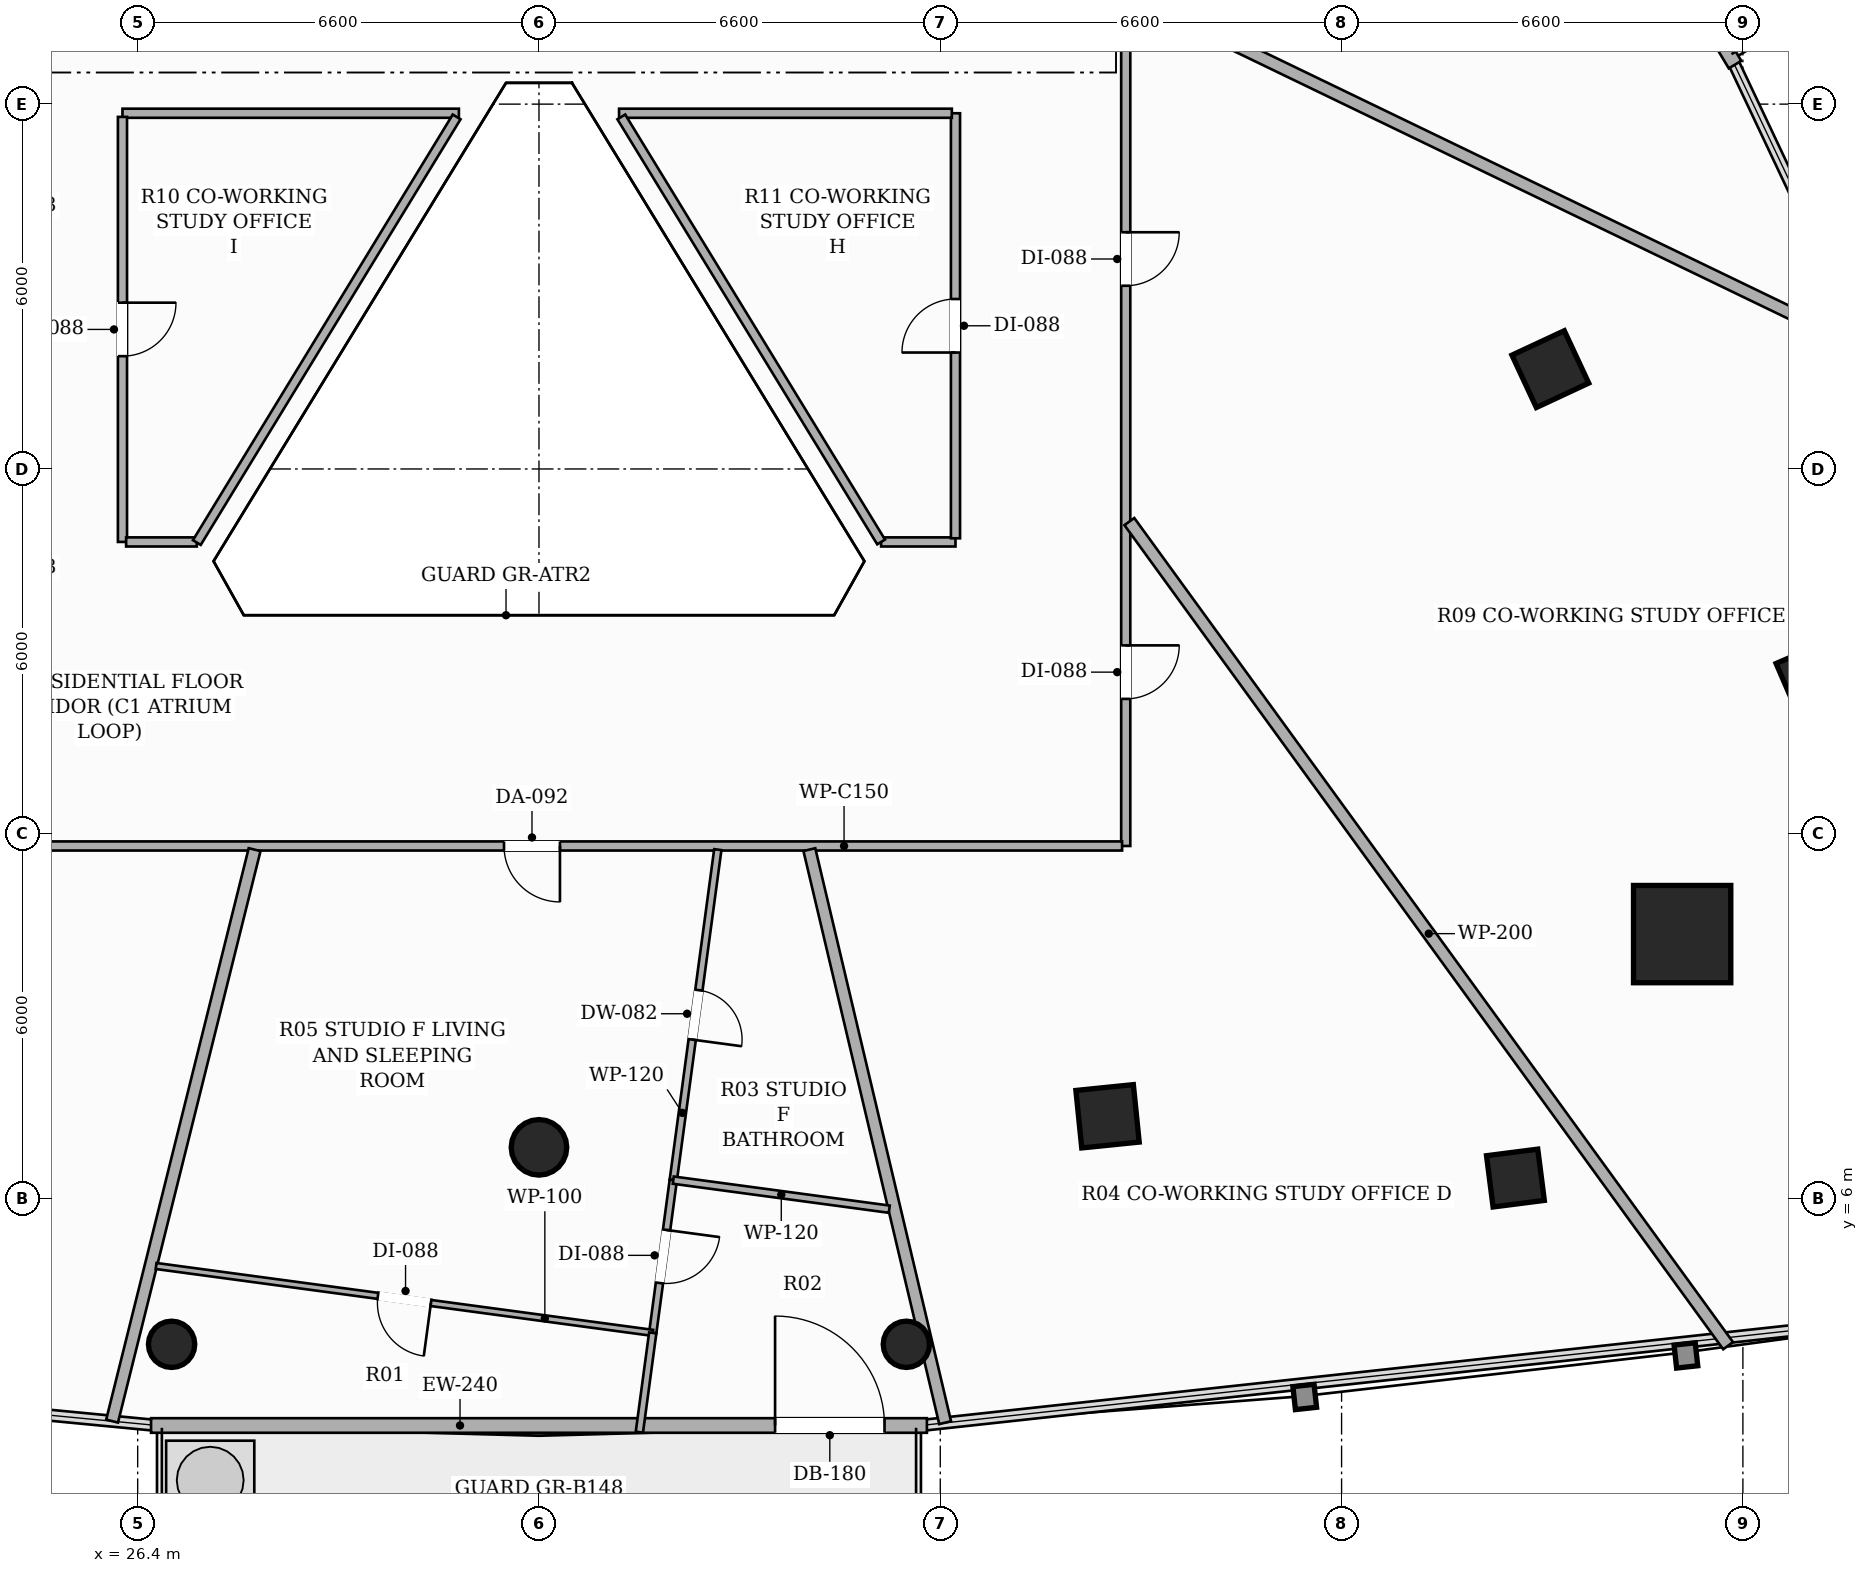
"""IFC4 building model, lengths in metres.
Left out: names, types, materials, properties, quantities, classifications, styles, units other than length and angle.
Written with IfcOpenShell. Run it as: python <this file> out.ifc"""

import sys

from ifc_helpers import new_model, si_unit, direction, frame, frame_2d, origin, origin_2d, place, context, subcontext, project, spatial, rectangle, hollow_rectangle, hollow_circle, extrude, element, fill, save


model = new_model("IFC4")
c1 = context("Model", 3, precision=1e-05, world=origin(), true_north=direction((0.0, 1.0)))
c2 = subcontext(c1, "Body", "Model", "MODEL_VIEW")
j1 = project(units=[si_unit("LENGTHUNIT", "METRE"), si_unit("PLANEANGLEUNIT", "RADIAN")], contexts=[c1])
p1 = place(None, origin())
s1 = spatial("IfcSite", under=j1, at=p1, CompositionType="ELEMENT")
p2 = place(p1, origin())
s2 = spatial("IfcBuilding", under=s1, at=p2, CompositionType="ELEMENT")
p3 = place(p2, frame((0.0, 0.0, 87.35)))
s3 = spatial("IfcBuildingStorey", under=s2, at=p3, CompositionType="ELEMENT", Elevation=87.35)
p4 = place(p3, frame((51.801, 10.351, 0.0), z_axis=(0.0, 0.0, 1.0), x_axis=(1.0, 0.0, 0.0)))
e1 = element("IfcColumn", 1, at=p4, inside=s3, PredefinedType="COLUMN", context=c2, shape_type="SweptSolid", body=[
    extrude(hollow_rectangle(XDim=1.6, YDim=1.6, WallThickness=0.05, at=origin_2d()), origin(), (0.0, 0.0, 1.0), 3.3),
])
p5 = place(p3, frame((33.0, 6.844, 0.0), z_axis=(0.0, 0.0, 1.0), x_axis=(1.0, 0.0, 0.0)))
e2 = element("IfcColumn", 2, at=p5, inside=s3, PredefinedType="COLUMN", context=c2, shape_type="SweptSolid", body=[
    extrude(hollow_circle(Radius=0.457, WallThickness=0.025, at=origin_2d()), origin(), (0.0, 0.0, 1.0), 3.3),
])
for number, where, z_axis, x_axis in (
    (3, (42.351, 7.355, 0.0), (0.0, 0.0, 1.0), (0.995, 0.101, 0.0)),
    (4, (49.633, 19.642, 0.0), (0.0, 0.0, 1.0), (-0.423, 0.906, 0.0)),
):
    element("IfcColumn", number, at=place(p3, frame(where, z_axis=z_axis, x_axis=x_axis)), inside=s3, PredefinedType="COLUMN", context=c2, shape_type="SweptSolid", body=[
        extrude(hollow_rectangle(XDim=0.95, YDim=0.95, WallThickness=0.032, at=origin_2d()), origin(), (0.0, 0.0, 1.0), 3.3),
    ])
for number, where, z_axis, x_axis in (
    (5, (49.059, 6.339, 0.0), (0.0, 0.0, 1.0), (0.992, 0.127, 0.0)),
    (6, (53.905, 14.58, 0.0), (0.0, 0.0, 1.0), (-0.397, 0.918, 0.0)),
):
    element("IfcColumn", number, at=place(p3, frame(where, z_axis=z_axis, x_axis=x_axis)), inside=s3, PredefinedType="COLUMN", context=c2, shape_type="SweptSolid", body=[
        extrude(hollow_rectangle(XDim=0.85, YDim=0.85, WallThickness=0.028, at=origin_2d()), origin(), (0.0, 0.0, 1.0), 3.3),
    ])
for number, where, z_axis, x_axis in (
    (7, (26.958, 3.605, 0.0), (0.0, 0.0, 1.0), (1.0, 0.0, 0.0)),
    (8, (39.042, 3.605, 0.0), (0.0, 0.0, 1.0), (1.0, 0.0, 0.0)),
):
    element("IfcColumn", number, at=place(p3, frame(where, z_axis=z_axis, x_axis=x_axis)), inside=s3, PredefinedType="COLUMN", context=c2, shape_type="SweptSolid", body=[
        extrude(hollow_circle(Radius=0.381, WallThickness=0.022, at=origin_2d()), origin(), (0.0, 0.0, 1.0), 3.3),
    ])
p6 = place(p3, frame((26.62, 2.27, 0.0), z_axis=(0.0, 0.0, 1.0), x_axis=(1.0, 0.0, 0.0)))
e9 = element("IfcWall", 9, at=p6, inside=s3, PredefinedType="SOLIDWALL", context=c2, shape_type="SweptSolid", body=[
    extrude(rectangle(XDim=12.76, YDim=0.24, at=frame_2d((6.38, 0.0))), origin(), (0.0, 0.0, 1.0), 2.624),
])
p7 = place(p6, frame((10.263, 0.0, 0.0)))
e10 = element("IfcOpeningElement", 10, at=p7, cuts=e9, PredefinedType="OPENING", context=c2, shape_type="SweptSolid", body=[
    extrude(rectangle(XDim=1.8, YDim=2.2, at=frame_2d((0.9, 1.1))), frame((0.0, 0.13, 0.0), z_axis=(0.0, -1.0, 0.0), x_axis=(1.0, 0.0, 0.0)), (0.0, 0.0, 1.0), 0.26),
])
p8 = place(p3, frame((52.671, 24.65, 0.0), z_axis=(0.0, 0.0, 1.0), x_axis=(-0.514338730901, 0.857587120877, 0.0)))
e11 = element("IfcWall", 11, at=p8, inside=s3, PredefinedType="SOLIDWALL", context=c2, shape_type="SweptSolid", body=[
    extrude(rectangle(XDim=12.348, YDim=0.24, at=frame_2d((6.174, 0.0))), origin(), (0.0, 0.0, 1.0), 2.624),
])
p9 = place(p8, frame((9.85, 0.0, 0.0)))
e12 = element("IfcOpeningElement", 12, at=p9, cuts=e11, PredefinedType="OPENING", context=c2, shape_type="SweptSolid", body=[
    extrude(rectangle(XDim=1.8, YDim=2.2, at=frame_2d((0.9, 1.1))), frame((0.0, 0.13, 0.0), z_axis=(0.0, -1.0, 0.0), x_axis=(1.0, 0.0, 0.0)), (0.0, 0.0, 1.0), 0.26),
])
p10 = place(p3, frame((42.65, 36.84, 0.0), z_axis=(0.0, 0.0, 1.0), x_axis=(0.0, -1.0, 0.0)))
e13 = element("IfcWall", 13, at=p10, inside=s3, PredefinedType="PARTITIONING", context=c2, shape_type="SweptSolid", body=[
    extrude(rectangle(XDim=25.04, YDim=0.15, at=frame_2d((12.52, 0.0))), origin(), (0.0, 0.0, 1.0), 2.413),
])
p11 = place(p10, frame((14.947, 0.0, 0.0)))
e14 = element("IfcOpeningElement", 14, at=p11, cuts=e13, PredefinedType="OPENING", context=c2, shape_type="SweptSolid", body=[
    extrude(rectangle(XDim=0.88, YDim=2.1, at=frame_2d((0.44, 1.05))), frame((0.0, 0.085, 0.0), z_axis=(0.0, -1.0, 0.0), x_axis=(1.0, 0.0, 0.0)), (0.0, 0.0, 1.0), 0.17),
])
p12 = place(p10, frame((21.741, 0.0, 0.0)))
e15 = element("IfcOpeningElement", 15, at=p12, cuts=e13, PredefinedType="OPENING", context=c2, shape_type="SweptSolid", body=[
    extrude(rectangle(XDim=0.88, YDim=2.1, at=frame_2d((0.44, 1.05))), frame((0.0, 0.085, 0.0), z_axis=(0.0, -1.0, 0.0), x_axis=(1.0, 0.0, 0.0)), (0.0, 0.0, 1.0), 0.17),
])
p13 = place(p10, frame((5.221, 0.0, 0.0)))
e16 = element("IfcOpeningElement", 16, at=p13, cuts=e13, PredefinedType="OPENING", context=c2, shape_type="SweptSolid", body=[
    extrude(rectangle(XDim=0.88, YDim=2.1, at=frame_2d((0.44, 1.05))), frame((0.0, 0.085, 0.0), z_axis=(0.0, -1.0, 0.0), x_axis=(1.0, 0.0, 0.0)), (0.0, 0.0, 1.0), 0.17),
])
p14 = place(p3, frame((42.59, 11.8, 0.0), z_axis=(0.0, 0.0, 1.0), x_axis=(-1.0, 0.0, 0.0)))
e17 = element("IfcWall", 17, at=p14, inside=s3, PredefinedType="PARTITIONING", context=c2, shape_type="SweptSolid", body=[
    extrude(rectangle(XDim=19.24, YDim=0.15, at=frame_2d((9.62, 0.0))), origin(), (0.0, 0.0, 1.0), 2.669),
])
p15 = place(p14, frame((9.245, 0.0, 0.0)))
e18 = element("IfcOpeningElement", 18, at=p15, cuts=e17, PredefinedType="OPENING", context=c2, shape_type="SweptSolid", body=[
    extrude(rectangle(XDim=0.92, YDim=2.15, at=frame_2d((0.46, 1.075))), frame((0.0, 0.085, 0.0), z_axis=(0.0, -1.0, 0.0), x_axis=(1.0, 0.0, 0.0)), (0.0, 0.0, 1.0), 0.17),
])
p16 = place(p3, frame((31.683, 23.85, 0.0), z_axis=(0.0, 0.0, 1.0), x_axis=(-1.0, 0.0, 0.0)))
e19 = element("IfcWall", 19, at=p16, inside=s3, PredefinedType="PARTITIONING", context=c2, shape_type="SweptSolid", body=[
    extrude(rectangle(XDim=5.533, YDim=0.15, at=frame_2d((2.767, 0.0))), origin(), (0.0, 0.0, 1.0), 2.669),
])
p17 = place(p3, frame((26.15, 23.79, 0.0), z_axis=(0.0, 0.0, 1.0), x_axis=(0.0, -1.0, 0.0)))
e20 = element("IfcWall", 20, at=p17, inside=s3, PredefinedType="PARTITIONING", context=c2, shape_type="SweptSolid", body=[
    extrude(rectangle(XDim=6.99, YDim=0.15, at=frame_2d((3.495, 0.0))), origin(), (0.0, 0.0, 1.0), 2.669),
])
p18 = place(p17, frame((3.055, 0.0, 0.0)))
e21 = element("IfcOpeningElement", 21, at=p18, cuts=e20, PredefinedType="OPENING", context=c2, shape_type="SweptSolid", body=[
    extrude(rectangle(XDim=0.88, YDim=2.1, at=frame_2d((0.44, 1.05))), frame((0.0, 0.085, 0.0), z_axis=(0.0, -1.0, 0.0), x_axis=(1.0, 0.0, 0.0)), (0.0, 0.0, 1.0), 0.17),
])
p19 = place(p3, frame((26.21, 16.8, 0.0), z_axis=(0.0, 0.0, 1.0), x_axis=(1.0, 0.0, 0.0)))
e22 = element("IfcWall", 22, at=p19, inside=s3, PredefinedType="PARTITIONING", context=c2, shape_type="SweptSolid", body=[
    extrude(rectangle(XDim=1.163, YDim=0.15, at=frame_2d((0.582, 0.0))), origin(), (0.0, 0.0, 1.0), 3.06),
])
p20 = place(p3, frame((38.627, 16.8, 0.0), z_axis=(0.0, 0.0, 1.0), x_axis=(1.0, 0.0, 0.0)))
e23 = element("IfcWall", 23, at=p20, inside=s3, PredefinedType="PARTITIONING", context=c2, shape_type="SweptSolid", body=[
    extrude(rectangle(XDim=1.223, YDim=0.15, at=frame_2d((0.612, 0.0))), origin(), (0.0, 0.0, 1.0), 3.06),
])
p21 = place(p3, frame((39.85, 16.86, 0.0), z_axis=(0.0, 0.0, 1.0), x_axis=(0.0, 1.0, 0.0)))
e24 = element("IfcWall", 24, at=p21, inside=s3, PredefinedType="PARTITIONING", context=c2, shape_type="SweptSolid", body=[
    extrude(rectangle(XDim=6.99, YDim=0.15, at=frame_2d((3.495, 0.0))), origin(), (0.0, 0.0, 1.0), 2.669),
])
p22 = place(p21, frame((3.055, 0.0, 0.0)))
e25 = element("IfcOpeningElement", 25, at=p22, cuts=e24, PredefinedType="OPENING", context=c2, shape_type="SweptSolid", body=[
    extrude(rectangle(XDim=0.88, YDim=2.1, at=frame_2d((0.44, 1.05))), frame((0.0, 0.085, 0.0), z_axis=(0.0, -1.0, 0.0), x_axis=(1.0, 0.0, 0.0)), (0.0, 0.0, 1.0), 0.17),
])
p23 = place(p3, frame((39.79, 23.85, 0.0), z_axis=(0.0, 0.0, 1.0), x_axis=(-1.0, 0.0, 0.0)))
e26 = element("IfcWall", 26, at=p23, inside=s3, PredefinedType="PARTITIONING", context=c2, shape_type="SweptSolid", body=[
    extrude(rectangle(XDim=5.473, YDim=0.15, at=frame_2d((2.737, 0.0))), origin(), (0.0, 0.0, 1.0), 2.669),
])
p24 = place(p3, frame((27.373, 16.79, 0.0), z_axis=(0.0, 0.0, 1.0), x_axis=(0.52102126657, 0.853543695297, 0.0)))
e27 = element("IfcWall", 27, at=p24, inside=s3, PredefinedType="PARTITIONING", context=c2, shape_type="SweptSolid", body=[
    extrude(rectangle(XDim=8.201, YDim=0.15, at=frame_2d((4.101, 0.0))), origin(), (0.0, 0.0, 1.0), 2.669),
])
p25 = place(p3, frame((34.354, 23.79, 0.0), z_axis=(0.0, 0.0, 1.0), x_axis=(0.521564518198, -0.853211845533, 0.0)))
e28 = element("IfcWall", 28, at=p25, inside=s3, PredefinedType="PARTITIONING", context=c2, shape_type="SweptSolid", body=[
    extrude(rectangle(XDim=8.193, YDim=0.15, at=frame_2d((4.096, 0.0))), origin(), (0.0, 0.0, 1.0), 2.669),
])
p26 = place(p3, frame((52.557, 3.582, 0.0), z_axis=(0.0, 0.0, 1.0), x_axis=(-0.587789493476, 0.809013912958, 0.0)))
e29 = element("IfcWall", 29, at=p26, inside=s3, PredefinedType="PARTITIONING", context=c2, shape_type="SweptSolid", body=[
    extrude(rectangle(XDim=16.752, YDim=0.2, at=frame_2d((8.376, 0.0))), origin(), (0.0, 0.0, 1.0), 2.413),
])
p27 = place(p3, frame((42.71, 25.813, 0.0), z_axis=(0.0, 0.0, 1.0), x_axis=(0.900554286339, -0.434743576556, 0.0)))
e30 = element("IfcWall", 30, at=p27, inside=s3, PredefinedType="PARTITIONING", context=c2, shape_type="SweptSolid", body=[
    extrude(rectangle(XDim=13.682, YDim=0.2, at=frame_2d((6.841, 0.0))), origin(), (0.0, 0.0, 1.0), 2.413),
])
p28 = place(p3, frame((28.323, 11.74, 0.0), z_axis=(0.0, 0.0, 1.0), x_axis=(-0.242001816391, -0.970275796289, 0.0)))
e31 = element("IfcWall", 31, at=p28, inside=s3, PredefinedType="PARTITIONING", context=c2, shape_type="SweptSolid", body=[
    extrude(rectangle(XDim=9.686, YDim=0.2, at=frame_2d((4.843, 0.0))), origin(), (0.0, 0.0, 1.0), 2.413),
])
p29 = place(p3, frame((39.68, 2.316, 0.0), z_axis=(0.0, 0.0, 1.0), x_axis=(-0.230553694048, 0.973059604629, 0.0)))
e32 = element("IfcWall", 32, at=p29, inside=s3, PredefinedType="PARTITIONING", context=c2, shape_type="SweptSolid", body=[
    extrude(rectangle(XDim=9.685, YDim=0.2, at=frame_2d((4.843, 0.0))), origin(), (0.0, 0.0, 1.0), 2.413),
])
p30 = place(p3, frame((35.941, 11.74, 0.0), z_axis=(0.0, 0.0, 1.0), x_axis=(-0.133464146048, -0.991053642201, 0.0)))
e33 = element("IfcWall", 33, at=p30, inside=s3, PredefinedType="PARTITIONING", context=c2, shape_type="SweptSolid", body=[
    extrude(rectangle(XDim=5.484, YDim=0.12, at=frame_2d((2.742, 0.0))), origin(), (0.0, 0.0, 1.0), 2.669),
])
p31 = place(p30, frame((2.332, 0.0, 0.0)))
e34 = element("IfcOpeningElement", 34, at=p31, cuts=e33, PredefinedType="OPENING", context=c2, shape_type="SweptSolid", body=[
    extrude(rectangle(XDim=0.82, YDim=2.1, at=frame_2d((0.41, 1.05))), frame((0.0, 0.07, 0.0), z_axis=(0.0, -1.0, 0.0), x_axis=(1.0, 0.0, 0.0)), (0.0, 0.0, 1.0), 0.14),
])
p32 = place(p3, frame((35.209, 6.305, 0.0), z_axis=(0.0, 0.0, 1.0), x_axis=(-0.133311944021, -0.991074127188, 0.0)))
e35 = element("IfcWall", 35, at=p32, inside=s3, PredefinedType="PARTITIONING", context=c2, shape_type="SweptSolid", body=[
    extrude(rectangle(XDim=2.535, YDim=0.12, at=frame_2d((1.267, 0.0))), origin(), (0.0, 0.0, 1.0), 2.413),
])
p33 = place(p32, frame((0.827, 0.0, 0.0)))
e36 = element("IfcOpeningElement", 36, at=p33, cuts=e35, PredefinedType="OPENING", context=c2, shape_type="SweptSolid", body=[
    extrude(rectangle(XDim=0.88, YDim=2.1, at=frame_2d((0.44, 1.05))), frame((0.0, 0.07, 0.0), z_axis=(0.0, -1.0, 0.0), x_axis=(1.0, 0.0, 0.0)), (0.0, 0.0, 1.0), 0.14),
])
p34 = place(p3, frame((34.871, 3.793, 0.0), z_axis=(0.0, 0.0, 1.0), x_axis=(-0.991052148622, 0.133475236324, 0.0)))
e37 = element("IfcWall", 37, at=p34, inside=s3, PredefinedType="PARTITIONING", context=c2, shape_type="SweptSolid", body=[
    extrude(rectangle(XDim=8.242, YDim=0.1, at=frame_2d((4.121, 0.0))), origin(), (0.0, 0.0, 1.0), 2.413),
])
p35 = place(p34, frame((3.681, 0.0, 0.0)))
e38 = element("IfcOpeningElement", 38, at=p35, cuts=e37, PredefinedType="OPENING", context=c2, shape_type="SweptSolid", body=[
    extrude(rectangle(XDim=0.88, YDim=2.1, at=frame_2d((0.44, 1.05))), frame((0.0, 0.06, 0.0), z_axis=(0.0, -1.0, 0.0), x_axis=(1.0, 0.0, 0.0)), (0.0, 0.0, 1.0), 0.12),
])
p36 = place(p3, frame((38.761, 5.827, 0.0), z_axis=(0.0, 0.0, 1.0), x_axis=(-0.991065337555, 0.133377272042, 0.0)))
e39 = element("IfcWall", 39, at=p36, inside=s3, PredefinedType="PARTITIONING", context=c2, shape_type="SweptSolid", body=[
    extrude(rectangle(XDim=3.584, YDim=0.12, at=frame_2d((1.792, 0.0))), origin(), (0.0, 0.0, 1.0), 2.669),
])
p37 = place(p3, frame((34.651, 2.16, 0.0), z_axis=(0.0, 0.0, 1.0), x_axis=(0.133638685836, 0.991030121463, 0.0)))
e40 = element("IfcWall", 40, at=p37, inside=s3, PredefinedType="PARTITIONING", context=c2, shape_type="SweptSolid", body=[
    extrude(rectangle(XDim=1.648, YDim=0.12, at=frame_2d((0.824, 0.0))), origin(), (0.0, 0.0, 1.0), 3.06),
])
p38 = place(p7, origin())
e41 = element("IfcDoor", 41, at=p38, inside=s3, OperationType="SINGLE_SWING_LEFT", PredefinedType="DOOR", context=c2, shape_type="SweptSolid", body=[
    extrude(rectangle(XDim=1.8, YDim=2.2, at=frame_2d((0.9, 1.1))), frame((0.0, 0.025, 0.0), z_axis=(0.0, -1.0, 0.0), x_axis=(1.0, 0.0, 0.0)), (0.0, 0.0, 1.0), 0.05),
])
fill(e10, e41)
p39 = place(p11, origin())
e42 = element("IfcDoor", 42, at=p39, inside=s3, OperationType="SINGLE_SWING_LEFT", PredefinedType="DOOR", context=c2, shape_type="SweptSolid", body=[
    extrude(rectangle(XDim=0.88, YDim=2.1, at=frame_2d((0.44, 1.05))), frame((0.0, 0.025, 0.0), z_axis=(0.0, -1.0, 0.0), x_axis=(1.0, 0.0, 0.0)), (0.0, 0.0, 1.0), 0.05),
])
fill(e14, e42)
p40 = place(p12, origin())
e43 = element("IfcDoor", 43, at=p40, inside=s3, OperationType="SINGLE_SWING_LEFT", PredefinedType="DOOR", context=c2, shape_type="SweptSolid", body=[
    extrude(rectangle(XDim=0.88, YDim=2.1, at=frame_2d((0.44, 1.05))), frame((0.0, 0.025, 0.0), z_axis=(0.0, -1.0, 0.0), x_axis=(1.0, 0.0, 0.0)), (0.0, 0.0, 1.0), 0.05),
])
fill(e15, e43)
p41 = place(p15, origin())
e44 = element("IfcDoor", 44, at=p41, inside=s3, OperationType="SINGLE_SWING_LEFT", PredefinedType="DOOR", context=c2, shape_type="SweptSolid", body=[
    extrude(rectangle(XDim=0.92, YDim=2.15, at=frame_2d((0.46, 1.075))), frame((0.0, 0.025, 0.0), z_axis=(0.0, -1.0, 0.0), x_axis=(1.0, 0.0, 0.0)), (0.0, 0.0, 1.0), 0.05),
])
fill(e18, e44)
p42 = place(p31, origin())
e45 = element("IfcDoor", 45, at=p42, inside=s3, OperationType="SINGLE_SWING_RIGHT", PredefinedType="DOOR", context=c2, shape_type="SweptSolid", body=[
    extrude(rectangle(XDim=0.82, YDim=2.1, at=frame_2d((0.41, 1.05))), frame((0.0, 0.025, 0.0), z_axis=(0.0, -1.0, 0.0), x_axis=(1.0, 0.0, 0.0)), (0.0, 0.0, 1.0), 0.05),
])
fill(e34, e45)
p43 = place(p33, origin())
e46 = element("IfcDoor", 46, at=p43, inside=s3, OperationType="SINGLE_SWING_LEFT", PredefinedType="DOOR", context=c2, shape_type="SweptSolid", body=[
    extrude(rectangle(XDim=0.88, YDim=2.1, at=frame_2d((0.44, 1.05))), frame((0.0, 0.025, 0.0), z_axis=(0.0, -1.0, 0.0), x_axis=(1.0, 0.0, 0.0)), (0.0, 0.0, 1.0), 0.05),
])
fill(e36, e46)
p44 = place(p35, origin())
e47 = element("IfcDoor", 47, at=p44, inside=s3, OperationType="SINGLE_SWING_LEFT", PredefinedType="DOOR", context=c2, shape_type="SweptSolid", body=[
    extrude(rectangle(XDim=0.88, YDim=2.1, at=frame_2d((0.44, 1.05))), frame((0.0, 0.025, 0.0), z_axis=(0.0, -1.0, 0.0), x_axis=(1.0, 0.0, 0.0)), (0.0, 0.0, 1.0), 0.05),
])
fill(e38, e47)
p45 = place(p22, origin())
e48 = element("IfcDoor", 48, at=p45, inside=s3, OperationType="SINGLE_SWING_LEFT", PredefinedType="DOOR", context=c2, shape_type="SweptSolid", body=[
    extrude(rectangle(XDim=0.88, YDim=2.1, at=frame_2d((0.44, 1.05))), frame((0.0, 0.025, 0.0), z_axis=(0.0, -1.0, 0.0), x_axis=(1.0, 0.0, 0.0)), (0.0, 0.0, 1.0), 0.05),
])
fill(e25, e48)
p46 = place(p18, origin())
e49 = element("IfcDoor", 49, at=p46, inside=s3, OperationType="SINGLE_SWING_LEFT", PredefinedType="DOOR", context=c2, shape_type="SweptSolid", body=[
    extrude(rectangle(XDim=0.88, YDim=2.1, at=frame_2d((0.44, 1.05))), frame((0.0, 0.025, 0.0), z_axis=(0.0, -1.0, 0.0), x_axis=(1.0, 0.0, 0.0)), (0.0, 0.0, 1.0), 0.05),
])
fill(e21, e49)
save(model, sys.argv[1])
